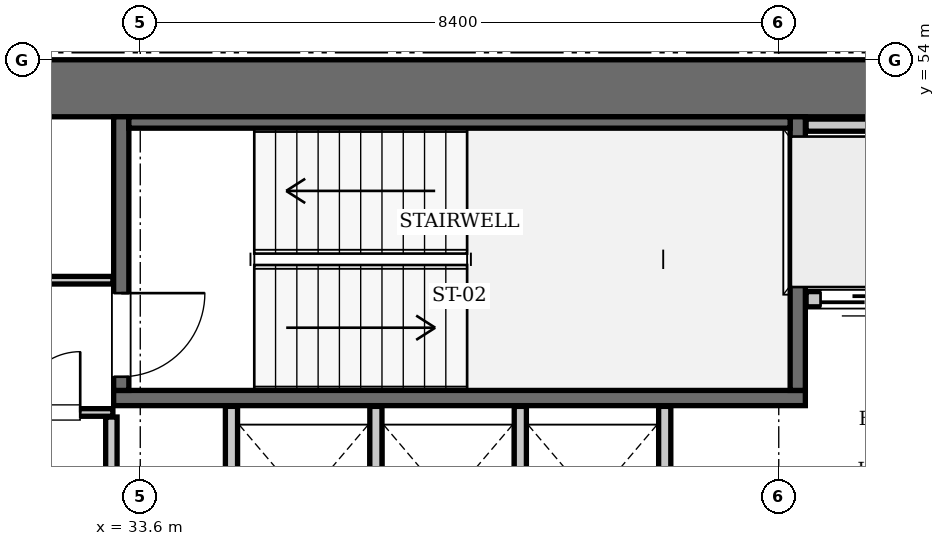
"""IFC4 building model, lengths in metres.
Left out: names, types, materials, properties, quantities, classifications, styles, units other than length and angle.
Written with IfcOpenShell. Run it as: python <this file> out.ifc"""

import sys

from ifc_helpers import new_model, si_unit, direction, frame, frame_2d, origin, place, context, subcontext, project, spatial, rectangle, extrude, element, fill, save


model = new_model("IFC4")
c1 = context("Model", 3, precision=1e-05, world=origin(), true_north=direction((0.0, 1.0)))
c2 = subcontext(c1, "Body", "Model", "MODEL_VIEW")
j1 = project(units=[si_unit("LENGTHUNIT", "METRE"), si_unit("PLANEANGLEUNIT", "RADIAN")], contexts=[c1])
p1 = place(None, origin())
s1 = spatial("IfcSite", under=j1, at=p1, CompositionType="ELEMENT")
p2 = place(p1, origin())
s2 = spatial("IfcBuilding", under=s1, at=p2, CompositionType="ELEMENT")
p3 = place(p2, frame((0.0, 0.0, 200.55)))
s3 = spatial("IfcBuildingStorey", under=s2, at=p3, CompositionType="ELEMENT", Elevation=200.55)
p4 = place(p3, frame((25.2, 53.625, 0.0), z_axis=(0.0, 0.0, 1.0), x_axis=(1.0, 0.0, 0.0)))
e1 = element("IfcWall", 1, at=p4, inside=s3, PredefinedType="SHEAR", context=c2, shape_type="SweptSolid", body=[
    extrude(rectangle(XDim=25.2, YDim=0.75, at=frame_2d((12.6, 0.0))), origin(), (0.0, 0.0, 1.0), 3.85),
])
p5 = place(p3, frame((33.25, 49.55, 0.0), z_axis=(0.0, 0.0, 1.0), x_axis=(1.0, 0.0, 0.0)))
e2 = element("IfcWall", 2, at=p5, inside=s3, PredefinedType="SOLIDWALL", context=c2, shape_type="SweptSolid", body=[
    extrude(rectangle(XDim=9.1, YDim=0.2, at=frame_2d((4.55, 0.0))), origin(), (0.0, 0.0, 1.0), 3.61),
])
p6 = place(p3, frame((42.25, 49.65, 0.0), z_axis=(0.0, 0.0, 1.0), x_axis=(0.0, 1.0, 0.0)))
e3 = element("IfcWall", 3, at=p6, inside=s3, PredefinedType="SOLIDWALL", context=c2, shape_type="SweptSolid", body=[
    extrude(rectangle(XDim=3.6, YDim=0.2, at=frame_2d((1.8, 0.0))), origin(), (0.0, 0.0, 1.0), 3.61),
])
p7 = place(p3, frame((33.35, 49.65, 0.0), z_axis=(0.0, 0.0, 1.0), x_axis=(0.0, 1.0, 0.0)))
e4 = element("IfcWall", 4, at=p7, inside=s3, PredefinedType="SOLIDWALL", context=c2, shape_type="SweptSolid", body=[
    extrude(rectangle(XDim=3.6, YDim=0.2, at=frame_2d((1.8, 0.0))), origin(), (0.0, 0.0, 1.0), 3.61),
])
p8 = place(p7, frame((0.18, 0.0, 0.0)))
e5 = element("IfcOpeningElement", 5, at=p8, cuts=e4, PredefinedType="OPENING", context=c2, shape_type="SweptSolid", body=[
    extrude(rectangle(XDim=1.1, YDim=2.15, at=frame_2d((0.55, 1.075))), frame((0.0, 0.11, 0.0), z_axis=(0.0, -1.0, 0.0), x_axis=(1.0, 0.0, 0.0)), (0.0, 0.0, 1.0), 0.22),
])
p9 = place(p3, frame((33.45, 53.175, 0.0), z_axis=(0.0, 0.0, 1.0), x_axis=(1.0, 0.0, 0.0)))
e6 = element("IfcWall", 6, at=p9, inside=s3, PredefinedType="SOLIDWALL", context=c2, shape_type="SweptSolid", body=[
    extrude(rectangle(XDim=8.7, YDim=0.15, at=frame_2d((4.35, 0.0))), origin(), (0.0, 0.0, 1.0), 3.61),
])
p10 = place(p3, frame((42.36, 50.85, 0.0), z_axis=(0.0, 0.0, 1.0), x_axis=(1.0, 0.0, 0.0)))
e7 = element("IfcWall", 7, at=p10, inside=s3, PredefinedType="SOLIDWALL", context=c2, shape_type="SweptSolid", body=[
    extrude(rectangle(XDim=1.38, YDim=0.2, at=frame_2d((0.69, 0.0))), origin(), (0.0, 0.0, 1.0), 3.61),
])
p11 = place(p10, frame((0.19, 0.0, 0.0)))
e8 = element("IfcOpeningElement", 8, at=p11, cuts=e7, PredefinedType="OPENING", context=c2, shape_type="SweptSolid", body=[
    extrude(rectangle(XDim=1.0, YDim=2.15, at=frame_2d((0.5, 1.075))), frame((0.0, 0.11, 0.0), z_axis=(0.0, -1.0, 0.0), x_axis=(1.0, 0.0, 0.0)), (0.0, 0.0, 1.0), 0.22),
])
p12 = place(p3, frame((42.36, 53.14, 0.0), z_axis=(0.0, 0.0, 1.0), x_axis=(1.0, 0.0, 0.0)))
e9 = element("IfcWall", 9, at=p12, inside=s3, PredefinedType="SOLIDWALL", context=c2, shape_type="SweptSolid", body=[
    extrude(rectangle(XDim=3.14, YDim=0.16, at=frame_2d((1.57, 0.0))), origin(), (0.0, 0.0, 1.0), 3.61),
])
for number, where, z_axis, x_axis in (
    (10, (34.8, 47.25, 0.0), (0.0, 0.0, 1.0), (0.0, 1.0, 0.0)),
    (11, (36.7, 47.25, 0.0), (0.0, 0.0, 1.0), (0.0, 1.0, 0.0)),
    (12, (38.6, 47.25, 0.0), (0.0, 0.0, 1.0), (0.0, 1.0, 0.0)),
    (13, (40.5, 47.25, 0.0), (0.0, 0.0, 1.0), (0.0, 1.0, 0.0)),
):
    element("IfcWall", number, at=place(p3, frame(where, z_axis=z_axis, x_axis=x_axis)), inside=s3, PredefinedType="SOLIDWALL", context=c2, shape_type="SweptSolid", body=[
        extrude(rectangle(XDim=2.19, YDim=0.16, at=frame_2d((1.095, 0.0))), origin(), (0.0, 0.0, 1.0), 3.61),
    ])
p13 = place(p3, frame((33.22, 45.14, 0.0), z_axis=(0.0, 0.0, 1.0), x_axis=(0.0, 1.0, 0.0)))
e14 = element("IfcWall", 14, at=p13, inside=s3, PredefinedType="PARTITIONING", context=c2, shape_type="SweptSolid", body=[
    extrude(rectangle(XDim=4.16, YDim=0.15, at=frame_2d((2.08, 0.0))), origin(), (0.0, 0.0, 1.0), 3.61),
])
p14 = place(p3, frame((30.06, 49.36, 0.0), z_axis=(0.0, 0.0, 1.0), x_axis=(1.0, 0.0, 0.0)))
e15 = element("IfcWall", 15, at=p14, inside=s3, PredefinedType="PARTITIONING", context=c2, shape_type="SweptSolid", body=[
    extrude(rectangle(XDim=3.18, YDim=0.1, at=frame_2d((1.59, 0.0))), origin(), (0.0, 0.0, 1.0), 3.61),
])
p15 = place(p14, frame((1.95, 0.0, 0.0)))
e16 = element("IfcOpeningElement", 16, at=p15, cuts=e15, PredefinedType="OPENING", context=c2, shape_type="SweptSolid", body=[
    extrude(rectangle(XDim=0.8, YDim=2.05, at=frame_2d((0.4, 1.025))), frame((0.0, 0.06, 0.0), z_axis=(0.0, -1.0, 0.0), x_axis=(1.0, 0.0, 0.0)), (0.0, 0.0, 1.0), 0.12),
])
p16 = place(p3, frame((31.82, 51.1, 0.0), z_axis=(0.0, 0.0, 1.0), x_axis=(1.0, 0.0, 0.0)))
e17 = element("IfcWall", 17, at=p16, inside=s3, PredefinedType="PARTITIONING", context=c2, shape_type="SweptSolid", body=[
    extrude(rectangle(XDim=1.42, YDim=0.1, at=frame_2d((0.71, 0.0))), origin(), (0.0, 0.0, 1.0), 3.61),
])
p17 = place(p8, frame((1.1, 0.0, 0.0), z_axis=(0.0, 0.0, 1.0), x_axis=(-1.0, 0.0, 0.0)))
e18 = element("IfcDoor", 18, at=p17, inside=s3, OperationType="SINGLE_SWING_LEFT", PredefinedType="DOOR", context=c2, shape_type="SweptSolid", body=[
    extrude(rectangle(XDim=1.1, YDim=2.15, at=frame_2d((0.55, 1.075))), frame((0.0, 0.025, 0.0), z_axis=(0.0, -1.0, 0.0), x_axis=(1.0, 0.0, 0.0)), (0.0, 0.0, 1.0), 0.05),
])
fill(e5, e18)
p18 = place(p11, frame((1.0, 0.0, 0.0), z_axis=(0.0, 0.0, 1.0), x_axis=(-1.0, 0.0, 0.0)))
e19 = element("IfcDoor", 19, at=p18, inside=s3, OperationType="SLIDING_TO_LEFT", PredefinedType="DOOR", context=c2, shape_type="SweptSolid", body=[
    extrude(rectangle(XDim=1.0, YDim=2.15, at=frame_2d((0.5, 1.075))), frame((0.0, 0.025, 0.0), z_axis=(0.0, -1.0, 0.0), x_axis=(1.0, 0.0, 0.0)), (0.0, 0.0, 1.0), 0.05),
])
fill(e8, e19)
p19 = place(p15, origin())
e20 = element("IfcDoor", 20, at=p19, inside=s3, OperationType="SINGLE_SWING_RIGHT", PredefinedType="DOOR", context=c2, shape_type="SweptSolid", body=[
    extrude(rectangle(XDim=0.8, YDim=2.05, at=frame_2d((0.4, 1.025))), frame((0.0, 0.025, 0.0), z_axis=(0.0, -1.0, 0.0), x_axis=(1.0, 0.0, 0.0)), (0.0, 0.0, 1.0), 0.05),
])
fill(e16, e20)
save(model, sys.argv[1])
